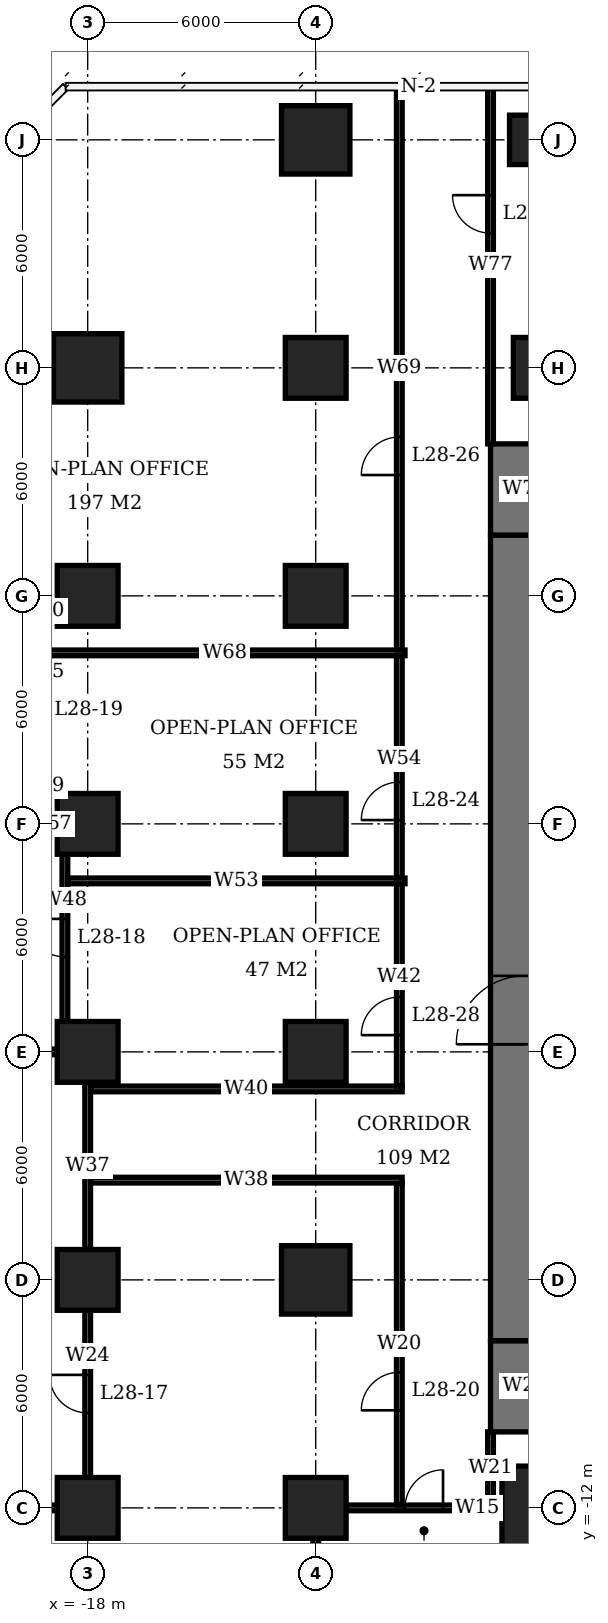
"""IFC4 building model, lengths in metres.
Left out: names, types, materials, properties, quantities, classifications, styles, units other than length and angle.
Written with IfcOpenShell. Run it as: python <this file> out.ifc"""

import sys

from ifc_helpers import new_model, si_unit, direction, frame, frame_2d, origin, origin_2d, place, context, subcontext, project, spatial, rectangle, extrude, element, fill, save


model = new_model("IFC4")
c1 = context("Model", 3, precision=1e-05, world=origin(), true_north=direction((0.0, 1.0)))
c2 = subcontext(c1, "Body", "Model", "MODEL_VIEW")
j1 = project(units=[si_unit("LENGTHUNIT", "METRE"), si_unit("PLANEANGLEUNIT", "RADIAN")], contexts=[c1])
p1 = place(None, origin())
s1 = spatial("IfcSite", under=j1, at=p1, CompositionType="ELEMENT")
p2 = place(p1, origin())
s2 = spatial("IfcBuilding", under=s1, at=p2, CompositionType="ELEMENT")
p3 = place(p2, frame((0.0, 0.0, 117.2)))
s3 = spatial("IfcBuildingStorey", under=s2, at=p3, CompositionType="ELEMENT", Elevation=117.2)
for number, where, z_axis, x_axis in (
    (1, (-18.0, -12.0, 0.0), (0.0, 0.0, 1.0), (1.0, 0.0, 0.0)),
    (2, (-18.0, -6.0, 0.0), (0.0, 0.0, 1.0), (1.0, 0.0, 0.0)),
    (3, (-18.0, 0.0, 0.0), (0.0, 0.0, 1.0), (1.0, 0.0, 0.0)),
    (4, (-18.0, 6.0, 0.0), (0.0, 0.0, 1.0), (1.0, 0.0, 0.0)),
    (5, (-18.0, 12.0, 0.0), (0.0, 0.0, 1.0), (1.0, 0.0, 0.0)),
):
    element("IfcColumn", number, at=place(p3, frame(where, z_axis=z_axis, x_axis=x_axis)), inside=s3, PredefinedType="COLUMN", context=c2, shape_type="SweptSolid", body=[
        extrude(rectangle(XDim=1.6, YDim=1.6, at=origin_2d()), origin(), (0.0, 0.0, 1.0), 3.9),
    ])
p4 = place(p3, frame((-18.0, 18.0, 0.0), z_axis=(0.0, 0.0, 1.0), x_axis=(1.0, 0.0, 0.0)))
e6 = element("IfcColumn", 6, at=p4, inside=s3, PredefinedType="COLUMN", context=c2, shape_type="SweptSolid", body=[
    extrude(rectangle(XDim=1.8, YDim=1.8, at=origin_2d()), origin(), (0.0, 0.0, 1.0), 3.9),
])
p5 = place(p3, frame((-12.0, -12.0, 0.0), z_axis=(0.0, 0.0, 1.0), x_axis=(1.0, 0.0, 0.0)))
e7 = element("IfcColumn", 7, at=p5, inside=s3, PredefinedType="COLUMN", context=c2, shape_type="SweptSolid", body=[
    extrude(rectangle(XDim=1.6, YDim=1.6, at=origin_2d()), origin(), (0.0, 0.0, 1.0), 3.9),
])
p6 = place(p3, frame((-12.0, -6.0, 0.0), z_axis=(0.0, 0.0, 1.0), x_axis=(1.0, 0.0, 0.0)))
e8 = element("IfcColumn", 8, at=p6, inside=s3, PredefinedType="COLUMN", context=c2, shape_type="SweptSolid", body=[
    extrude(rectangle(XDim=1.8, YDim=1.8, at=origin_2d()), origin(), (0.0, 0.0, 1.0), 3.9),
])
for number, where, z_axis, x_axis in (
    (9, (-12.0, 0.0, 0.0), (0.0, 0.0, 1.0), (1.0, 0.0, 0.0)),
    (10, (-12.0, 6.0, 0.0), (0.0, 0.0, 1.0), (1.0, 0.0, 0.0)),
    (11, (-12.0, 12.0, 0.0), (0.0, 0.0, 1.0), (1.0, 0.0, 0.0)),
    (12, (-12.0, 18.0, 0.0), (0.0, 0.0, 1.0), (1.0, 0.0, 0.0)),
):
    element("IfcColumn", number, at=place(p3, frame(where, z_axis=z_axis, x_axis=x_axis)), inside=s3, PredefinedType="COLUMN", context=c2, shape_type="SweptSolid", body=[
        extrude(rectangle(XDim=1.6, YDim=1.6, at=origin_2d()), origin(), (0.0, 0.0, 1.0), 3.9),
    ])
p7 = place(p3, frame((-12.0, 24.0, 0.0), z_axis=(0.0, 0.0, 1.0), x_axis=(1.0, 0.0, 0.0)))
e13 = element("IfcColumn", 13, at=p7, inside=s3, PredefinedType="COLUMN", context=c2, shape_type="SweptSolid", body=[
    extrude(rectangle(XDim=1.8, YDim=1.8, at=origin_2d()), origin(), (0.0, 0.0, 1.0), 3.9),
])
p8 = place(p3, frame((-6.0, -12.0, 0.0), z_axis=(0.0, 0.0, 1.0), x_axis=(1.0, 0.0, 0.0)))
e14 = element("IfcColumn", 14, at=p8, inside=s3, PredefinedType="COLUMN", context=c2, shape_type="SweptSolid", body=[
    extrude(rectangle(XDim=2.2, YDim=2.2, at=origin_2d()), origin(), (0.0, 0.0, 1.0), 3.9),
])
p9 = place(p3, frame((-6.0, 18.0, 0.0), z_axis=(0.0, 0.0, 1.0), x_axis=(1.0, 0.0, 0.0)))
e15 = element("IfcColumn", 15, at=p9, inside=s3, PredefinedType="COLUMN", context=c2, shape_type="SweptSolid", body=[
    extrude(rectangle(XDim=1.6, YDim=1.6, at=origin_2d()), origin(), (0.0, 0.0, 1.0), 3.9),
])
p10 = place(p3, frame((-6.0, 24.0, 0.0), z_axis=(0.0, 0.0, 1.0), x_axis=(1.0, 0.0, 0.0)))
e16 = element("IfcColumn", 16, at=p10, inside=s3, PredefinedType="COLUMN", context=c2, shape_type="SweptSolid", body=[
    extrude(rectangle(XDim=1.8, YDim=1.3, at=origin_2d()), origin(), (0.0, 0.0, 1.0), 3.9),
])
p11 = place(p3, frame((-6.5, -7.6, 0.0), z_axis=(0.0, 0.0, 1.0), x_axis=(0.0, 1.0, 0.0)))
e17 = element("IfcWall", 17, at=p11, inside=s3, PredefinedType="SHEAR", context=c2, shape_type="SweptSolid", body=[
    extrude(rectangle(XDim=21.2, YDim=1.8, at=frame_2d((10.6, 0.0))), origin(), (0.0, 0.0, 1.0), 3.9),
])
p12 = place(p11, frame((7.8, 0.0, 0.0)))
e18 = element("IfcOpeningElement", 18, at=p12, cuts=e17, PredefinedType="OPENING", context=c2, shape_type="SweptSolid", body=[
    extrude(rectangle(XDim=1.8, YDim=2.4, at=frame_2d((0.9, 1.2))), frame((0.0, 0.91, 0.0), z_axis=(0.0, -1.0, 0.0), x_axis=(1.0, 0.0, 0.0)), (0.0, 0.0, 1.0), 1.82),
])
for number, where, z_axis, x_axis in (
    (19, (-6.5, -10.0, 0.0), (0.0, 0.0, 1.0), (0.0, 1.0, 0.0)),
    (20, (-6.5, 13.6, 0.0), (0.0, 0.0, 1.0), (0.0, 1.0, 0.0)),
):
    element("IfcWall", number, at=place(p3, frame(where, z_axis=z_axis, x_axis=x_axis)), inside=s3, PredefinedType="SHEAR", context=c2, shape_type="SweptSolid", body=[
        extrude(rectangle(XDim=2.4, YDim=1.8, at=frame_2d((1.2, 0.0))), origin(), (0.0, 0.0, 1.0), 3.9),
    ])
p13 = place(p3, frame((-22.923, 24.37, 0.0), z_axis=(0.0, 0.0, 1.0), x_axis=(0.707106781187, 0.707106781187, 0.0)))
e21 = element("IfcWall", 21, at=p13, inside=s3, PredefinedType="USERDEFINED", context=c2, shape_type="SweptSolid", body=[
    extrude(rectangle(XDim=6.438, YDim=0.3, at=frame_2d((3.219, 0.0))), origin(), (0.0, 0.0, 1.0), 0.6),
])
p14 = place(p3, frame((-22.31, -12.0, 0.0), z_axis=(0.0, 0.0, 1.0), x_axis=(1.0, 0.0, 0.0)))
e22 = element("IfcWall", 22, at=p14, inside=s3, PredefinedType="PARTITIONING", context=c2, shape_type="SweptSolid", body=[
    extrude(rectangle(XDim=3.51, YDim=0.15, at=frame_2d((1.755, 0.0))), origin(), (0.0, 0.0, 1.0), 2.65),
])
p15 = place(p3, frame((-11.2, -12.0, 0.0), z_axis=(0.0, 0.0, 1.0), x_axis=(1.0, 0.0, 0.0)))
e23 = element("IfcWall", 23, at=p15, inside=s3, PredefinedType="PARTITIONING", context=c2, shape_type="SweptSolid", body=[
    extrude(rectangle(XDim=4.1, YDim=0.15, at=frame_2d((2.05, 0.0))), origin(), (0.0, 0.0, 1.0), 3.65),
])
p16 = place(p15, frame((1.55, 0.0, 0.0)))
e24 = element("IfcOpeningElement", 24, at=p16, cuts=e23, PredefinedType="OPENING", context=c2, shape_type="SweptSolid", body=[
    extrude(rectangle(XDim=1.0, YDim=2.1, at=frame_2d((0.5, 1.05))), frame((0.0, 0.085, 0.0), z_axis=(0.0, -1.0, 0.0), x_axis=(1.0, 0.0, 0.0)), (0.0, 0.0, 1.0), 0.17),
])
p17 = place(p3, frame((-22.31, 0.0, 0.0), z_axis=(0.0, 0.0, 1.0), x_axis=(1.0, 0.0, 0.0)))
e25 = element("IfcWall", 25, at=p17, inside=s3, PredefinedType="PARTITIONING", context=c2, shape_type="SweptSolid", body=[
    extrude(rectangle(XDim=3.51, YDim=0.15, at=frame_2d((1.755, 0.0))), origin(), (0.0, 0.0, 1.0), 2.65),
])
p18 = place(p3, frame((-19.2, 6.0, 0.0), z_axis=(0.0, 0.0, 1.0), x_axis=(1.0, 0.0, 0.0)))
e26 = element("IfcWall", 26, at=p18, inside=s3, PredefinedType="PARTITIONING", context=c2, shape_type="SweptSolid", body=[
    extrude(rectangle(XDim=0.4, YDim=0.15, at=frame_2d((0.2, 0.0))), origin(), (0.0, 0.0, 1.0), 2.65),
])
p19 = place(p3, frame((-18.6, 0.8, 0.0), z_axis=(0.0, 0.0, 1.0), x_axis=(0.0, 1.0, 0.0)))
e27 = element("IfcWall", 27, at=p19, inside=s3, PredefinedType="PARTITIONING", context=c2, shape_type="SweptSolid", body=[
    extrude(rectangle(XDim=4.4, YDim=0.15, at=frame_2d((2.2, 0.0))), origin(), (0.0, 0.0, 1.0), 3.65),
])
p20 = place(p19, frame((1.7, 0.0, 0.0)))
e28 = element("IfcOpeningElement", 28, at=p20, cuts=e27, PredefinedType="OPENING", context=c2, shape_type="SweptSolid", body=[
    extrude(rectangle(XDim=1.0, YDim=2.1, at=frame_2d((0.5, 1.05))), frame((0.0, 0.085, 0.0), z_axis=(0.0, -1.0, 0.0), x_axis=(1.0, 0.0, 0.0)), (0.0, 0.0, 1.0), 0.17),
])
p21 = place(p3, frame((-18.0, -11.2, 0.0), z_axis=(0.0, 0.0, 1.0), x_axis=(0.0, 1.0, 0.0)))
e29 = element("IfcWall", 29, at=p21, inside=s3, PredefinedType="PARTITIONING", context=c2, shape_type="SweptSolid", body=[
    extrude(rectangle(XDim=4.4, YDim=0.15, at=frame_2d((2.2, 0.0))), origin(), (0.0, 0.0, 1.0), 3.65),
])
p22 = place(p21, frame((1.7, 0.0, 0.0)))
e30 = element("IfcOpeningElement", 30, at=p22, cuts=e29, PredefinedType="OPENING", context=c2, shape_type="SweptSolid", body=[
    extrude(rectangle(XDim=1.0, YDim=2.1, at=frame_2d((0.5, 1.05))), frame((0.0, 0.085, 0.0), z_axis=(0.0, -1.0, 0.0), x_axis=(1.0, 0.0, 0.0)), (0.0, 0.0, 1.0), 0.17),
])
p23 = place(p3, frame((-18.0, -5.2, 0.0), z_axis=(0.0, 0.0, 1.0), x_axis=(0.0, 1.0, 0.0)))
e31 = element("IfcWall", 31, at=p23, inside=s3, PredefinedType="PARTITIONING", context=c2, shape_type="SweptSolid", body=[
    extrude(rectangle(XDim=4.4, YDim=0.15, at=frame_2d((2.2, 0.0))), origin(), (0.0, 0.0, 1.0), 3.65),
])
p24 = place(p3, frame((-12.0, -16.31, 0.0), z_axis=(0.0, 0.0, 1.0), x_axis=(0.0, 1.0, 0.0)))
e32 = element("IfcWall", 32, at=p24, inside=s3, PredefinedType="PARTITIONING", context=c2, shape_type="SweptSolid", body=[
    extrude(rectangle(XDim=3.51, YDim=0.15, at=frame_2d((1.755, 0.0))), origin(), (0.0, 0.0, 1.0), 2.65),
])
p25 = place(p3, frame((-19.125, 10.5, 0.0), z_axis=(0.0, 0.0, 1.0), x_axis=(1.0, 0.0, 0.0)))
e33 = element("IfcWall", 33, at=p25, inside=s3, PredefinedType="PARTITIONING", context=c2, shape_type="SweptSolid", body=[
    extrude(rectangle(XDim=9.475, YDim=0.15, at=frame_2d((4.738, 0.0))), origin(), (0.0, 0.0, 1.0), 3.65),
])
p26 = place(p3, frame((-18.525, 4.5, 0.0), z_axis=(0.0, 0.0, 1.0), x_axis=(1.0, 0.0, 0.0)))
e34 = element("IfcWall", 34, at=p26, inside=s3, PredefinedType="PARTITIONING", context=c2, shape_type="SweptSolid", body=[
    extrude(rectangle(XDim=8.875, YDim=0.15, at=frame_2d((4.438, 0.0))), origin(), (0.0, 0.0, 1.0), 3.65),
])
for number, where, z_axis, x_axis in (
    (35, (-17.925, -3.375, 0.0), (0.0, 0.0, 1.0), (1.0, 0.0, 0.0)),
    (36, (-17.925, -0.975, 0.0), (0.0, 0.0, 1.0), (1.0, 0.0, 0.0)),
):
    element("IfcWall", number, at=place(p3, frame(where, z_axis=z_axis, x_axis=x_axis)), inside=s3, PredefinedType="PARTITIONING", context=c2, shape_type="SweptSolid", body=[
        extrude(rectangle(XDim=8.2, YDim=0.15, at=frame_2d((4.1, 0.0))), origin(), (0.0, 0.0, 1.0), 3.65),
    ])
p27 = place(p3, frame((-9.8, -11.925, 0.0), z_axis=(0.0, 0.0, 1.0), x_axis=(0.0, 1.0, 0.0)))
e37 = element("IfcWall", 37, at=p27, inside=s3, PredefinedType="PARTITIONING", context=c2, shape_type="SweptSolid", body=[
    extrude(rectangle(XDim=8.475, YDim=0.15, at=frame_2d((4.238, 0.0))), origin(), (0.0, 0.0, 1.0), 3.65),
])
p28 = place(p27, frame((2.493, 0.0, 0.0)))
e38 = element("IfcOpeningElement", 38, at=p28, cuts=e37, PredefinedType="OPENING", context=c2, shape_type="SweptSolid", body=[
    extrude(rectangle(XDim=1.0, YDim=2.1, at=frame_2d((0.5, 1.05))), frame((0.0, 0.085, 0.0), z_axis=(0.0, -1.0, 0.0), x_axis=(1.0, 0.0, 0.0)), (0.0, 0.0, 1.0), 0.17),
])
p29 = place(p3, frame((-9.8, -0.9, 0.0), z_axis=(0.0, 0.0, 1.0), x_axis=(0.0, 1.0, 0.0)))
e39 = element("IfcWall", 39, at=p29, inside=s3, PredefinedType="PARTITIONING", context=c2, shape_type="SweptSolid", body=[
    extrude(rectangle(XDim=5.325, YDim=0.15, at=frame_2d((2.663, 0.0))), origin(), (0.0, 0.0, 1.0), 3.65),
])
p30 = place(p29, frame((1.341, 0.0, 0.0)))
e40 = element("IfcOpeningElement", 40, at=p30, cuts=e39, PredefinedType="OPENING", context=c2, shape_type="SweptSolid", body=[
    extrude(rectangle(XDim=1.0, YDim=2.1, at=frame_2d((0.5, 1.05))), frame((0.0, 0.085, 0.0), z_axis=(0.0, -1.0, 0.0), x_axis=(1.0, 0.0, 0.0)), (0.0, 0.0, 1.0), 0.17),
])
p31 = place(p3, frame((-9.8, 4.575, 0.0), z_axis=(0.0, 0.0, 1.0), x_axis=(0.0, 1.0, 0.0)))
e41 = element("IfcWall", 41, at=p31, inside=s3, PredefinedType="PARTITIONING", context=c2, shape_type="SweptSolid", body=[
    extrude(rectangle(XDim=5.85, YDim=0.15, at=frame_2d((2.925, 0.0))), origin(), (0.0, 0.0, 1.0), 3.65),
])
p32 = place(p31, frame((1.525, 0.0, 0.0)))
e42 = element("IfcOpeningElement", 42, at=p32, cuts=e41, PredefinedType="OPENING", context=c2, shape_type="SweptSolid", body=[
    extrude(rectangle(XDim=1.0, YDim=2.1, at=frame_2d((0.5, 1.05))), frame((0.0, 0.085, 0.0), z_axis=(0.0, -1.0, 0.0), x_axis=(1.0, 0.0, 0.0)), (0.0, 0.0, 1.0), 0.17),
])
p33 = place(p3, frame((-9.8, 10.575, 0.0), z_axis=(0.0, 0.0, 1.0), x_axis=(0.0, 1.0, 0.0)))
e43 = element("IfcWall", 43, at=p33, inside=s3, PredefinedType="PARTITIONING", context=c2, shape_type="SweptSolid", body=[
    extrude(rectangle(XDim=14.825, YDim=0.15, at=frame_2d((7.413, 0.0))), origin(), (0.0, 0.0, 1.0), 3.65),
])
p34 = place(p33, frame((4.605, 0.0, 0.0)))
e44 = element("IfcOpeningElement", 44, at=p34, cuts=e43, PredefinedType="OPENING", context=c2, shape_type="SweptSolid", body=[
    extrude(rectangle(XDim=1.0, YDim=2.1, at=frame_2d((0.5, 1.05))), frame((0.0, 0.085, 0.0), z_axis=(0.0, -1.0, 0.0), x_axis=(1.0, 0.0, 0.0)), (0.0, 0.0, 1.0), 0.17),
])
p35 = place(p3, frame((-7.4, -11.925, 0.0), z_axis=(0.0, 0.0, 1.0), x_axis=(0.0, 1.0, 0.0)))
e45 = element("IfcWall", 45, at=p35, inside=s3, PredefinedType="PARTITIONING", context=c2, shape_type="SweptSolid", body=[
    extrude(rectangle(XDim=1.925, YDim=0.15, at=frame_2d((0.962, 0.0))), origin(), (0.0, 0.0, 1.0), 3.65),
])
p36 = place(p3, frame((-7.4, 16.0, 0.0), z_axis=(0.0, 0.0, 1.0), x_axis=(0.0, 1.0, 0.0)))
e46 = element("IfcWall", 46, at=p36, inside=s3, PredefinedType="PARTITIONING", context=c2, shape_type="SweptSolid", body=[
    extrude(rectangle(XDim=9.4, YDim=0.15, at=frame_2d((4.7, 0.0))), origin(), (0.0, 0.0, 1.0), 3.65),
])
p37 = place(p36, frame((5.545, 0.0, 0.0)))
e47 = element("IfcOpeningElement", 47, at=p37, cuts=e46, PredefinedType="OPENING", context=c2, shape_type="SweptSolid", body=[
    extrude(rectangle(XDim=1.0, YDim=2.1, at=frame_2d((0.5, 1.05))), frame((0.0, 0.085, 0.0), z_axis=(0.0, -1.0, 0.0), x_axis=(1.0, 0.0, 0.0)), (0.0, 0.0, 1.0), 0.17),
])
p38 = place(p12, origin())
e48 = element("IfcDoor", 48, at=p38, inside=s3, OperationType="DOUBLE_DOOR_SINGLE_SWING", PredefinedType="DOOR", context=c2, shape_type="SweptSolid", body=[
    extrude(rectangle(XDim=1.8, YDim=2.4, at=frame_2d((0.9, 1.2))), frame((0.0, 0.025, 0.0), z_axis=(0.0, -1.0, 0.0), x_axis=(1.0, 0.0, 0.0)), (0.0, 0.0, 1.0), 0.05),
])
fill(e18, e48)
p39 = place(p16, origin())
e49 = element("IfcDoor", 49, at=p39, inside=s3, OperationType="SINGLE_SWING_RIGHT", PredefinedType="DOOR", context=c2, shape_type="SweptSolid", body=[
    extrude(rectangle(XDim=1.0, YDim=2.1, at=frame_2d((0.5, 1.05))), frame((0.0, 0.025, 0.0), z_axis=(0.0, -1.0, 0.0), x_axis=(1.0, 0.0, 0.0)), (0.0, 0.0, 1.0), 0.05),
])
fill(e24, e49)
p40 = place(p22, origin())
e50 = element("IfcDoor", 50, at=p40, inside=s3, OperationType="SINGLE_SWING_RIGHT", PredefinedType="DOOR", context=c2, shape_type="SweptSolid", body=[
    extrude(rectangle(XDim=1.0, YDim=2.1, at=frame_2d((0.5, 1.05))), frame((0.0, 0.025, 0.0), z_axis=(0.0, -1.0, 0.0), x_axis=(1.0, 0.0, 0.0)), (0.0, 0.0, 1.0), 0.05),
])
fill(e30, e50)
p41 = place(p20, origin())
e51 = element("IfcDoor", 51, at=p41, inside=s3, OperationType="SINGLE_SWING_RIGHT", PredefinedType="DOOR", context=c2, shape_type="SweptSolid", body=[
    extrude(rectangle(XDim=1.0, YDim=2.1, at=frame_2d((0.5, 1.05))), frame((0.0, 0.025, 0.0), z_axis=(0.0, -1.0, 0.0), x_axis=(1.0, 0.0, 0.0)), (0.0, 0.0, 1.0), 0.05),
])
fill(e28, e51)
p42 = place(p28, origin())
e52 = element("IfcDoor", 52, at=p42, inside=s3, OperationType="SINGLE_SWING_LEFT", PredefinedType="DOOR", context=c2, shape_type="SweptSolid", body=[
    extrude(rectangle(XDim=1.0, YDim=2.1, at=frame_2d((0.5, 1.05))), frame((0.0, 0.025, 0.0), z_axis=(0.0, -1.0, 0.0), x_axis=(1.0, 0.0, 0.0)), (0.0, 0.0, 1.0), 0.05),
])
fill(e38, e52)
p43 = place(p32, origin())
e53 = element("IfcDoor", 53, at=p43, inside=s3, OperationType="SINGLE_SWING_LEFT", PredefinedType="DOOR", context=c2, shape_type="SweptSolid", body=[
    extrude(rectangle(XDim=1.0, YDim=2.1, at=frame_2d((0.5, 1.05))), frame((0.0, 0.025, 0.0), z_axis=(0.0, -1.0, 0.0), x_axis=(1.0, 0.0, 0.0)), (0.0, 0.0, 1.0), 0.05),
])
fill(e42, e53)
p44 = place(p34, origin())
e54 = element("IfcDoor", 54, at=p44, inside=s3, OperationType="SINGLE_SWING_LEFT", PredefinedType="DOOR", context=c2, shape_type="SweptSolid", body=[
    extrude(rectangle(XDim=1.0, YDim=2.1, at=frame_2d((0.5, 1.05))), frame((0.0, 0.025, 0.0), z_axis=(0.0, -1.0, 0.0), x_axis=(1.0, 0.0, 0.0)), (0.0, 0.0, 1.0), 0.05),
])
fill(e44, e54)
p45 = place(p37, origin())
e55 = element("IfcDoor", 55, at=p45, inside=s3, OperationType="SINGLE_SWING_RIGHT", PredefinedType="DOOR", context=c2, shape_type="SweptSolid", body=[
    extrude(rectangle(XDim=1.0, YDim=2.1, at=frame_2d((0.5, 1.05))), frame((0.0, 0.025, 0.0), z_axis=(0.0, -1.0, 0.0), x_axis=(1.0, 0.0, 0.0)), (0.0, 0.0, 1.0), 0.05),
])
fill(e47, e55)
p46 = place(p30, origin())
e56 = element("IfcDoor", 56, at=p46, inside=s3, OperationType="SINGLE_SWING_LEFT", PredefinedType="DOOR", context=c2, shape_type="SweptSolid", body=[
    extrude(rectangle(XDim=1.0, YDim=2.1, at=frame_2d((0.5, 1.05))), frame((0.0, 0.025, 0.0), z_axis=(0.0, -1.0, 0.0), x_axis=(1.0, 0.0, 0.0)), (0.0, 0.0, 1.0), 0.05),
])
fill(e40, e56)
save(model, sys.argv[1])
